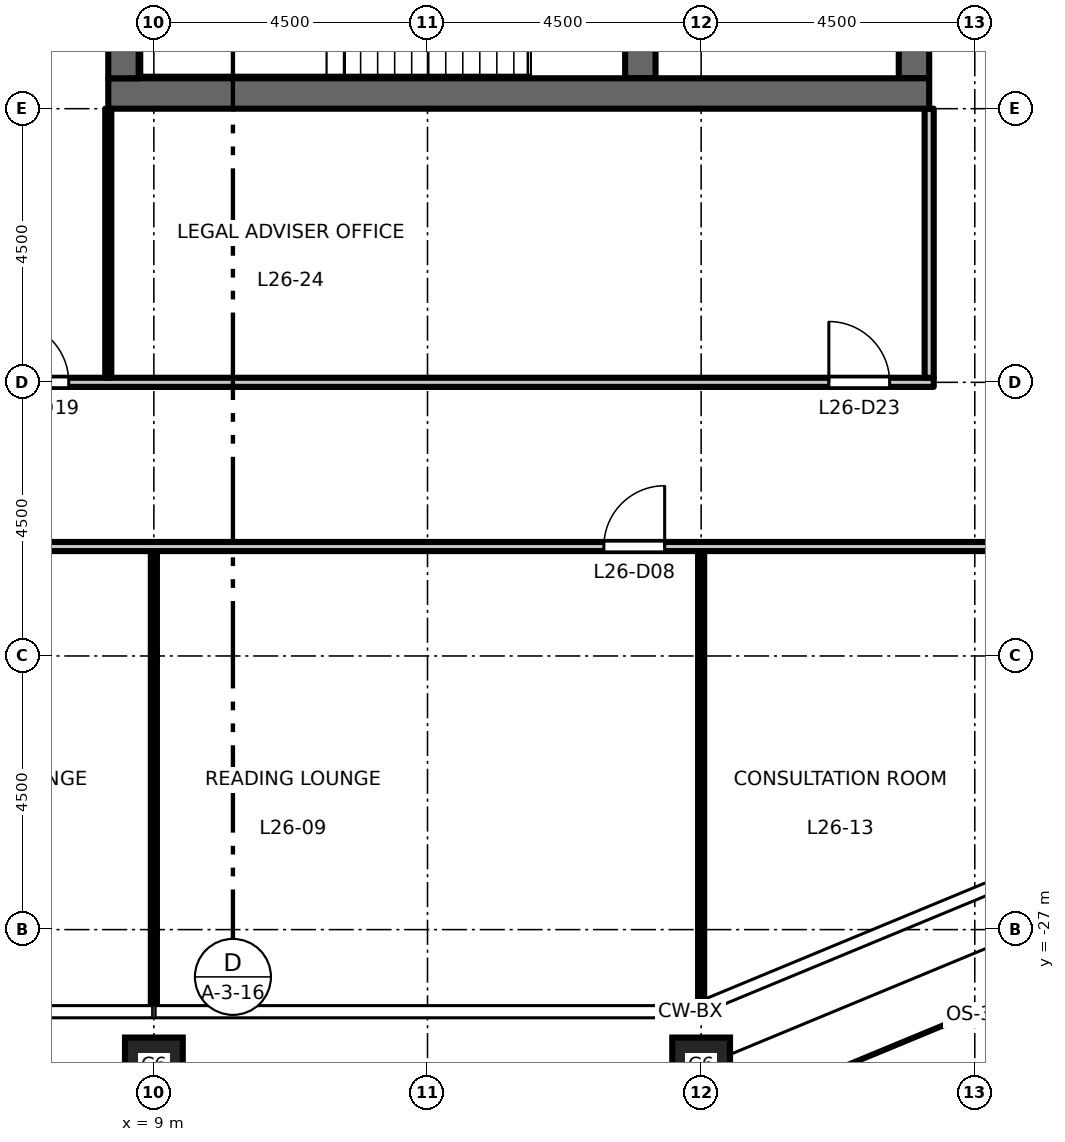
"""IFC4 building model, lengths in metres.
Left out: names, types, materials, properties, quantities, classifications, styles, units other than length and angle.
Written with IfcOpenShell. Run it as: python <this file> out.ifc"""

import sys

from ifc_helpers import new_model, si_unit, direction, frame, frame_2d, origin, origin_2d, place, context, subcontext, project, spatial, rectangle, hollow_rectangle, extrude, element, fill, save


model = new_model("IFC4")
c1 = context("Model", 3, precision=1e-05, world=origin(), true_north=direction((0.0, 1.0)))
c2 = subcontext(c1, "Body", "Model", "MODEL_VIEW")
j1 = project(units=[si_unit("LENGTHUNIT", "METRE"), si_unit("PLANEANGLEUNIT", "RADIAN")], contexts=[c1])
p1 = place(None, origin())
s1 = spatial("IfcSite", under=j1, at=p1, CompositionType="ELEMENT")
p2 = place(p1, origin())
s2 = spatial("IfcBuilding", under=s1, at=p2, CompositionType="ELEMENT")
p3 = place(p2, frame((0.0, 0.0, 122.7)))
s3 = spatial("IfcBuildingStorey", under=s2, at=p3, CompositionType="ELEMENT", Elevation=122.7)
for number, where, z_axis, x_axis in (
    (1, (9.0, -29.25, 0.0), (0.0, 0.0, 1.0), (1.0, 0.0, 0.0)),
    (2, (18.0, -29.25, 0.0), (0.0, 0.0, 1.0), (1.0, 0.0, 0.0)),
):
    element("IfcColumn", number, at=place(p3, frame(where, z_axis=z_axis, x_axis=x_axis)), inside=s3, PredefinedType="COLUMN", context=c2, shape_type="SweptSolid", body=[
        extrude(hollow_rectangle(XDim=0.95, YDim=0.95, WallThickness=0.055, at=origin_2d()), origin(), (0.0, 0.0, 1.0), 4.5),
    ])
p4 = place(p3, frame((21.5, -13.0, 0.0), z_axis=(0.0, 0.0, 1.0), x_axis=(0.0, 1.0, 0.0)))
e3 = element("IfcWall", 3, at=p4, inside=s3, PredefinedType="SHEAR", context=c2, shape_type="SweptSolid", body=[
    extrude(rectangle(XDim=26.0, YDim=0.5, at=frame_2d((13.0, 0.0))), origin(), (0.0, 0.0, 1.0), 4.35),
])
p5 = place(p4, frame((16.825, 0.0, 0.0)))
e4 = element("IfcOpeningElement", 4, at=p5, cuts=e3, PredefinedType="OPENING", context=c2, shape_type="SweptSolid", body=[
    extrude(rectangle(XDim=1.8, YDim=2.1, at=frame_2d((0.9, 1.05))), frame((0.0, 0.26, 0.0), z_axis=(0.0, -1.0, 0.0), x_axis=(1.0, 0.0, 0.0)), (0.0, 0.0, 1.0), 0.52),
])
p6 = place(p4, frame((7.375, 0.0, 0.0)))
e5 = element("IfcOpeningElement", 5, at=p6, cuts=e3, PredefinedType="OPENING", context=c2, shape_type="SweptSolid", body=[
    extrude(rectangle(XDim=1.8, YDim=2.1, at=frame_2d((0.9, 1.05))), frame((0.0, 0.26, 0.0), z_axis=(0.0, -1.0, 0.0), x_axis=(1.0, 0.0, 0.0)), (0.0, 0.0, 1.0), 0.52),
])
p7 = place(p4, frame((1.3, 0.0, 0.0)))
e6 = element("IfcOpeningElement", 6, at=p7, cuts=e3, PredefinedType="OPENING", context=c2, shape_type="SweptSolid", body=[
    extrude(rectangle(XDim=0.9, YDim=2.1, at=frame_2d((0.45, 1.05))), frame((0.0, 0.26, 0.0), z_axis=(0.0, -1.0, 0.0), x_axis=(1.0, 0.0, 0.0)), (0.0, 0.0, 1.0), 0.52),
])
p8 = place(p3, frame((17.0, -13.0, 0.0), z_axis=(0.0, 0.0, 1.0), x_axis=(0.0, 1.0, 0.0)))
e7 = element("IfcWall", 7, at=p8, inside=s3, PredefinedType="SHEAR", context=c2, shape_type="SweptSolid", body=[
    extrude(rectangle(XDim=6.575, YDim=0.5, at=frame_2d((3.288, 0.0))), origin(), (0.0, 0.0, 1.0), 4.35),
])
p9 = place(p3, frame((8.25, -13.25, 0.0), z_axis=(0.0, 0.0, 1.0), x_axis=(1.0, 0.0, 0.0)))
e8 = element("IfcWall", 8, at=p9, inside=s3, PredefinedType="SHEAR", context=c2, shape_type="SweptSolid", body=[
    extrude(rectangle(XDim=13.5, YDim=0.5, at=frame_2d((6.75, 0.0))), origin(), (0.0, 0.0, 1.0), 4.35),
])
p10 = place(p3, frame((8.5, -13.0, 0.0), z_axis=(0.0, 0.0, 1.0), x_axis=(0.0, 1.0, 0.0)))
e9 = element("IfcWall", 9, at=p10, inside=s3, PredefinedType="SHEAR", context=c2, shape_type="SweptSolid", body=[
    extrude(rectangle(XDim=26.0, YDim=0.5, at=frame_2d((13.0, 0.0))), origin(), (0.0, 0.0, 1.0), 4.35),
])
p11 = place(p3, frame((-27.06, -20.7, 0.0), z_axis=(0.0, 0.0, 1.0), x_axis=(1.0, 0.0, 0.0)))
e10 = element("IfcWall", 10, at=p11, inside=s3, PredefinedType="PARTITIONING", context=c2, shape_type="SweptSolid", body=[
    extrude(rectangle(XDim=54.12, YDim=0.15, at=frame_2d((27.06, 0.0))), origin(), (0.0, 0.0, 1.0), 4.35),
])
p12 = place(p11, frame((9.71, 0.0, 0.0)))
e11 = element("IfcOpeningElement", 11, at=p12, cuts=e10, PredefinedType="OPENING", context=c2, shape_type="SweptSolid", body=[
    extrude(rectangle(XDim=1.0, YDim=2.1, at=frame_2d((0.5, 1.05))), frame((0.0, 0.085, 0.0), z_axis=(0.0, -1.0, 0.0), x_axis=(1.0, 0.0, 0.0)), (0.0, 0.0, 1.0), 0.17),
])
p13 = place(p11, frame((25.46, 0.0, 0.0)))
e12 = element("IfcOpeningElement", 12, at=p13, cuts=e10, PredefinedType="OPENING", context=c2, shape_type="SweptSolid", body=[
    extrude(rectangle(XDim=1.0, YDim=2.1, at=frame_2d((0.5, 1.05))), frame((0.0, 0.085, 0.0), z_axis=(0.0, -1.0, 0.0), x_axis=(1.0, 0.0, 0.0)), (0.0, 0.0, 1.0), 0.17),
])
p14 = place(p11, frame((27.71, 0.0, 0.0)))
e13 = element("IfcOpeningElement", 13, at=p14, cuts=e10, PredefinedType="OPENING", context=c2, shape_type="SweptSolid", body=[
    extrude(rectangle(XDim=1.0, YDim=2.1, at=frame_2d((0.5, 1.05))), frame((0.0, 0.085, 0.0), z_axis=(0.0, -1.0, 0.0), x_axis=(1.0, 0.0, 0.0)), (0.0, 0.0, 1.0), 0.17),
])
p15 = place(p11, frame((43.46, 0.0, 0.0)))
e14 = element("IfcOpeningElement", 14, at=p15, cuts=e10, PredefinedType="OPENING", context=c2, shape_type="SweptSolid", body=[
    extrude(rectangle(XDim=1.0, YDim=2.1, at=frame_2d((0.5, 1.05))), frame((0.0, 0.085, 0.0), z_axis=(0.0, -1.0, 0.0), x_axis=(1.0, 0.0, 0.0)), (0.0, 0.0, 1.0), 0.17),
])
p16 = place(p11, frame((0.65, 0.0, 0.0)))
e15 = element("IfcOpeningElement", 15, at=p16, cuts=e10, PredefinedType="OPENING", context=c2, shape_type="SweptSolid", body=[
    extrude(rectangle(XDim=1.0, YDim=2.1, at=frame_2d((0.5, 1.05))), frame((0.0, 0.085, 0.0), z_axis=(0.0, -1.0, 0.0), x_axis=(1.0, 0.0, 0.0)), (0.0, 0.0, 1.0), 0.17),
])
p17 = place(p11, frame((52.46, 0.0, 0.0)))
e16 = element("IfcOpeningElement", 16, at=p17, cuts=e10, PredefinedType="OPENING", context=c2, shape_type="SweptSolid", body=[
    extrude(rectangle(XDim=1.0, YDim=2.1, at=frame_2d((0.5, 1.05))), frame((0.0, 0.085, 0.0), z_axis=(0.0, -1.0, 0.0), x_axis=(1.0, 0.0, 0.0)), (0.0, 0.0, 1.0), 0.17),
])
p18 = place(p3, frame((-21.825, -18.0, 0.0), z_axis=(0.0, 0.0, 1.0), x_axis=(1.0, 0.0, 0.0)))
e17 = element("IfcWall", 17, at=p18, inside=s3, PredefinedType="PARTITIONING", context=c2, shape_type="SweptSolid", body=[
    extrude(rectangle(XDim=43.65, YDim=0.15, at=frame_2d((21.825, 0.0))), origin(), (0.0, 0.0, 1.0), 4.35),
])
p19 = place(p18, frame((14.175, 0.0, 0.0)))
e18 = element("IfcOpeningElement", 18, at=p19, cuts=e17, PredefinedType="OPENING", context=c2, shape_type="SweptSolid", body=[
    extrude(rectangle(XDim=1.0, YDim=2.1, at=frame_2d((0.5, 1.05))), frame((0.0, 0.085, 0.0), z_axis=(0.0, -1.0, 0.0), x_axis=(1.0, 0.0, 0.0)), (0.0, 0.0, 1.0), 0.17),
])
p20 = place(p18, frame((28.425, 0.0, 0.0)))
e19 = element("IfcOpeningElement", 19, at=p20, cuts=e17, PredefinedType="OPENING", context=c2, shape_type="SweptSolid", body=[
    extrude(rectangle(XDim=1.0, YDim=2.1, at=frame_2d((0.5, 1.05))), frame((0.0, 0.085, 0.0), z_axis=(0.0, -1.0, 0.0), x_axis=(1.0, 0.0, 0.0)), (0.0, 0.0, 1.0), 0.17),
])
p21 = place(p18, frame((0.675, 0.0, 0.0)))
e20 = element("IfcOpeningElement", 20, at=p21, cuts=e17, PredefinedType="OPENING", context=c2, shape_type="SweptSolid", body=[
    extrude(rectangle(XDim=1.0, YDim=2.1, at=frame_2d((0.5, 1.05))), frame((0.0, 0.085, 0.0), z_axis=(0.0, -1.0, 0.0), x_axis=(1.0, 0.0, 0.0)), (0.0, 0.0, 1.0), 0.17),
])
p22 = place(p18, frame((41.925, 0.0, 0.0)))
e21 = element("IfcOpeningElement", 21, at=p22, cuts=e17, PredefinedType="OPENING", context=c2, shape_type="SweptSolid", body=[
    extrude(rectangle(XDim=1.0, YDim=2.1, at=frame_2d((0.5, 1.05))), frame((0.0, 0.085, 0.0), z_axis=(0.0, -1.0, 0.0), x_axis=(1.0, 0.0, 0.0)), (0.0, 0.0, 1.0), 0.17),
])
p23 = place(p3, frame((8.25, -17.925, 0.0), z_axis=(0.0, 0.0, 1.0), x_axis=(0.0, 1.0, 0.0)))
e22 = element("IfcWall", 22, at=p23, inside=s3, PredefinedType="PARTITIONING", context=c2, shape_type="SweptSolid", body=[
    extrude(rectangle(XDim=4.425, YDim=0.1, at=frame_2d((2.212, 0.0))), origin(), (0.0, 0.0, 1.0), 4.35),
])
p24 = place(p3, frame((9.0, -28.26, 0.0), z_axis=(0.0, 0.0, 1.0), x_axis=(0.0, 1.0, 0.0)))
e23 = element("IfcWall", 23, at=p24, inside=s3, PredefinedType="PARTITIONING", context=c2, shape_type="SweptSolid", body=[
    extrude(rectangle(XDim=7.485, YDim=0.1, at=frame_2d((3.743, 0.0))), origin(), (0.0, 0.0, 1.0), 3.45),
])
p25 = place(p3, frame((18.0, -28.178, 0.0), z_axis=(0.0, 0.0, 1.0), x_axis=(0.0, 1.0, 0.0)))
e24 = element("IfcWall", 24, at=p25, inside=s3, PredefinedType="PARTITIONING", context=c2, shape_type="SweptSolid", body=[
    extrude(rectangle(XDim=7.403, YDim=0.1, at=frame_2d((3.702, 0.0))), origin(), (0.0, 0.0, 1.0), 3.45),
])
p26 = place(p3, frame((21.75, -17.925, 0.0), z_axis=(0.0, 0.0, 1.0), x_axis=(0.0, 1.0, 0.0)))
e25 = element("IfcWall", 25, at=p26, inside=s3, PredefinedType="PARTITIONING", context=c2, shape_type="SweptSolid", body=[
    extrude(rectangle(XDim=4.425, YDim=0.15, at=frame_2d((2.212, 0.0))), origin(), (0.0, 0.0, 1.0), 4.35),
])
p27 = place(p15, origin())
e26 = element("IfcDoor", 26, at=p27, inside=s3, OperationType="SINGLE_SWING_RIGHT", PredefinedType="DOOR", context=c2, shape_type="SweptSolid", body=[
    extrude(rectangle(XDim=1.0, YDim=2.1, at=frame_2d((0.5, 1.05))), frame((0.0, 0.025, 0.0), z_axis=(0.0, -1.0, 0.0), x_axis=(1.0, 0.0, 0.0)), (0.0, 0.0, 1.0), 0.05),
])
fill(e14, e26)
p28 = place(p20, origin())
e27 = element("IfcDoor", 27, at=p28, inside=s3, OperationType="SINGLE_SWING_LEFT", PredefinedType="DOOR", context=c2, shape_type="SweptSolid", body=[
    extrude(rectangle(XDim=1.0, YDim=2.1, at=frame_2d((0.5, 1.05))), frame((0.0, 0.025, 0.0), z_axis=(0.0, -1.0, 0.0), x_axis=(1.0, 0.0, 0.0)), (0.0, 0.0, 1.0), 0.05),
])
fill(e19, e27)
p29 = place(p22, origin())
e28 = element("IfcDoor", 28, at=p29, inside=s3, OperationType="SINGLE_SWING_LEFT", PredefinedType="DOOR", context=c2, shape_type="SweptSolid", body=[
    extrude(rectangle(XDim=1.0, YDim=2.1, at=frame_2d((0.5, 1.05))), frame((0.0, 0.025, 0.0), z_axis=(0.0, -1.0, 0.0), x_axis=(1.0, 0.0, 0.0)), (0.0, 0.0, 1.0), 0.05),
])
fill(e21, e28)
save(model, sys.argv[1])
